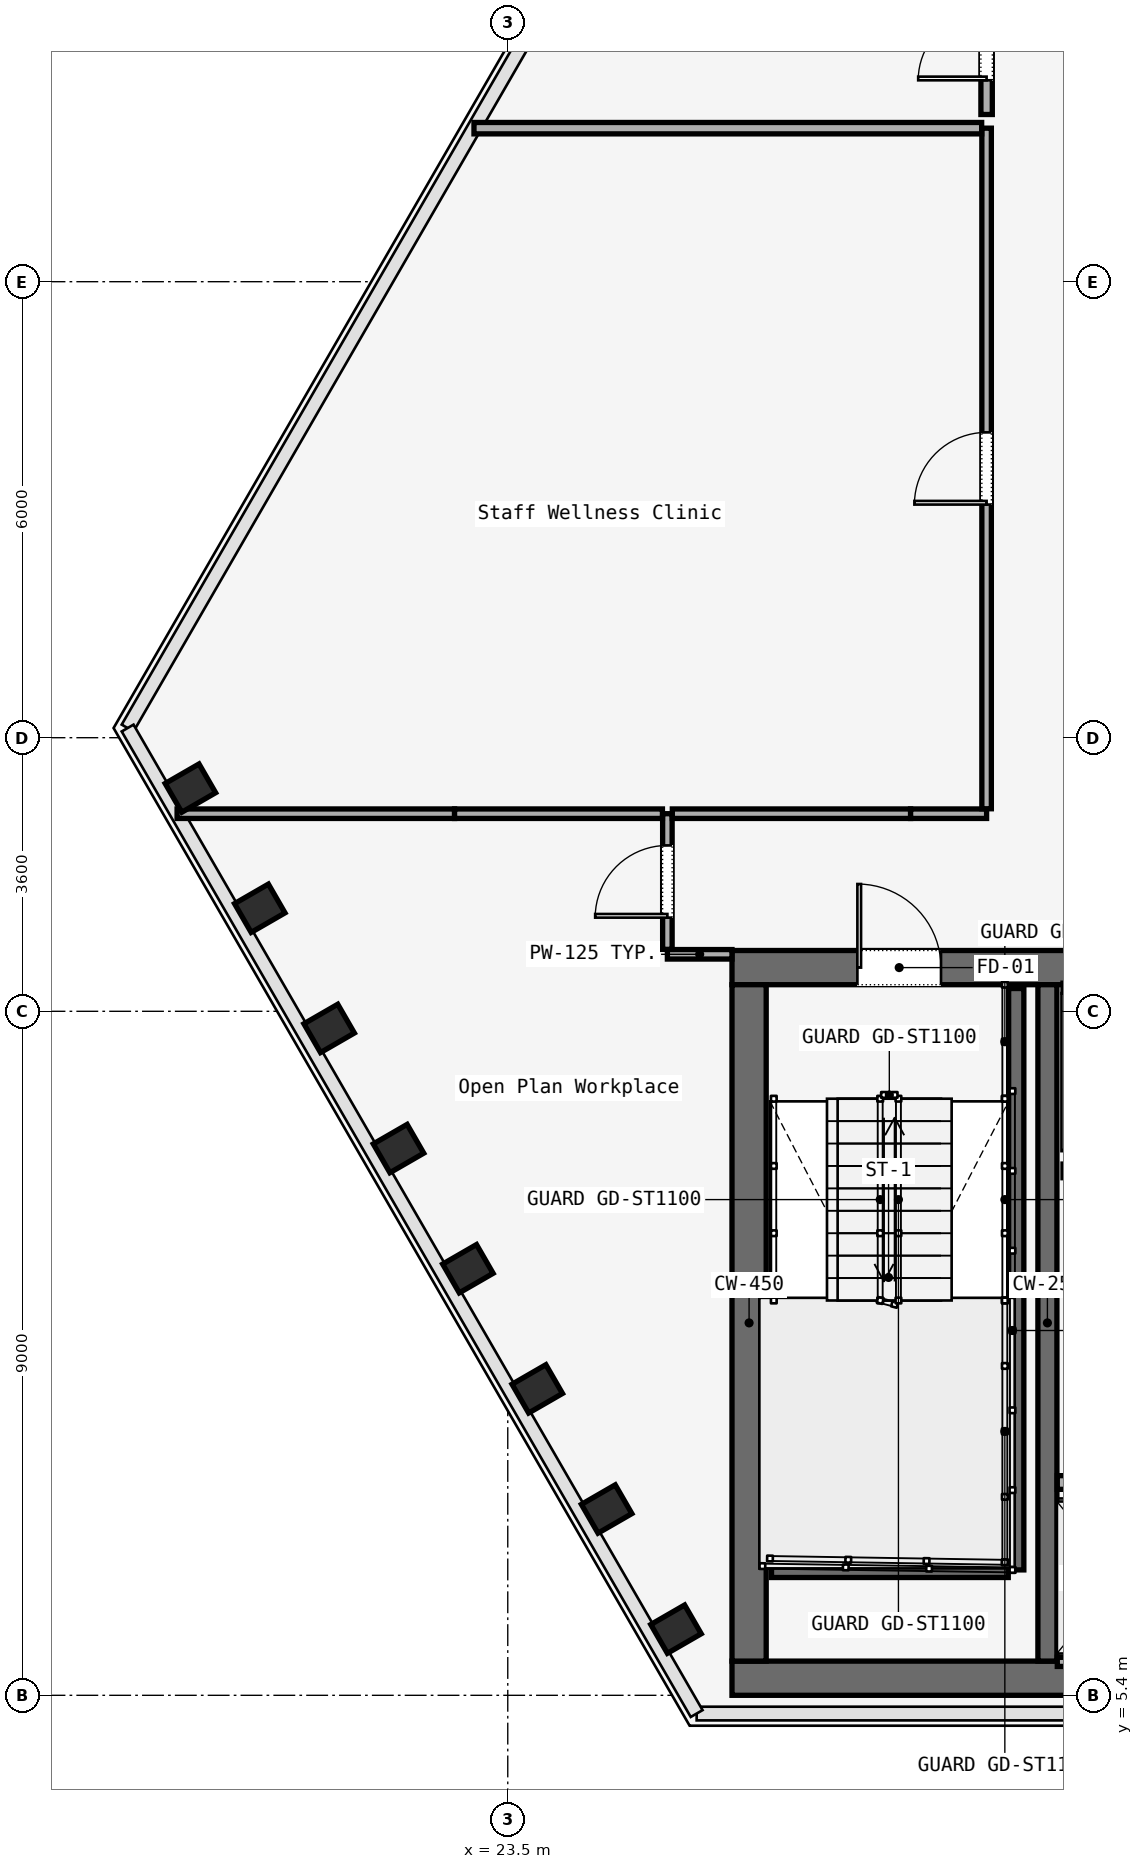
"""IFC4 building model, lengths in metres.
Left out: names, types, materials, properties, quantities, classifications, styles, units other than length and angle.
Written with IfcOpenShell. Run it as: python <this file> out.ifc"""

import sys

from ifc_helpers import new_model, si_unit, direction, frame, frame_2d, origin, origin_2d, place, context, subcontext, project, spatial, rectangle, i_section, extrude, element, fill, save


model = new_model("IFC4")
c1 = context("Model", 3, precision=1e-05, world=origin(), true_north=direction((0.0, 1.0)))
c2 = subcontext(c1, "Body", "Model", "MODEL_VIEW")
j1 = project(units=[si_unit("LENGTHUNIT", "METRE"), si_unit("PLANEANGLEUNIT", "RADIAN")], contexts=[c1])
p1 = place(None, origin())
s1 = spatial("IfcSite", under=j1, at=p1, CompositionType="ELEMENT")
p2 = place(p1, origin())
s2 = spatial("IfcBuilding", under=s1, at=p2, CompositionType="ELEMENT")
p3 = place(p2, frame((0.0, 0.0, 77.8)))
s3 = spatial("IfcBuildingStorey", under=s2, at=p3, CompositionType="ELEMENT", Elevation=77.8)
p4 = place(p3, frame((26.45, 14.975, 0.0), z_axis=(0.0, 0.0, 1.0), x_axis=(1.0, 0.0, 0.0)))
e1 = element("IfcWall", 1, at=p4, inside=s3, PredefinedType="SOLIDWALL", context=c2, shape_type="SweptSolid", body=[
    extrude(rectangle(XDim=31.1, YDim=0.45, at=frame_2d((15.55, 0.0))), origin(), (0.0, 0.0, 1.0), 3.58),
])
p5 = place(p4, frame((1.65, 0.0, 0.0)))
e2 = element("IfcOpeningElement", 2, at=p5, cuts=e1, PredefinedType="OPENING", context=c2, shape_type="SweptSolid", body=[
    extrude(rectangle(XDim=1.1, YDim=2.2, at=frame_2d((0.55, 1.1))), frame((0.0, 0.225, 0.0), z_axis=(0.0, -1.0, 0.0), x_axis=(1.0, 0.0, 0.0)), (0.0, 0.0, 1.0), 0.45),
])
p6 = place(p4, frame((13.65, 0.0, 0.0)))
e3 = element("IfcOpeningElement", 3, at=p6, cuts=e1, PredefinedType="OPENING", context=c2, shape_type="SweptSolid", body=[
    extrude(rectangle(XDim=1.1, YDim=2.2, at=frame_2d((0.55, 1.1))), frame((0.0, 0.225, 0.0), z_axis=(0.0, -1.0, 0.0), x_axis=(1.0, 0.0, 0.0)), (0.0, 0.0, 1.0), 0.45),
])
p7 = place(p4, frame((25.55, 0.0, 0.0)))
e4 = element("IfcOpeningElement", 4, at=p7, cuts=e1, PredefinedType="OPENING", context=c2, shape_type="SweptSolid", body=[
    extrude(rectangle(XDim=1.1, YDim=2.2, at=frame_2d((0.55, 1.1))), frame((0.0, 0.225, 0.0), z_axis=(0.0, -1.0, 0.0), x_axis=(1.0, 0.0, 0.0)), (0.0, 0.0, 1.0), 0.45),
])
p8 = place(p4, frame((10.7, 0.0, 0.0)))
e5 = element("IfcOpeningElement", 5, at=p8, cuts=e1, PredefinedType="OPENING", context=c2, shape_type="SweptSolid", body=[
    extrude(rectangle(XDim=1.4, YDim=2.2, at=frame_2d((0.7, 1.1))), frame((0.0, 0.225, 0.0), z_axis=(0.0, -1.0, 0.0), x_axis=(1.0, 0.0, 0.0)), (0.0, 0.0, 1.0), 0.45),
])
p9 = place(p4, frame((19.35, 0.0, 0.0)))
e6 = element("IfcOpeningElement", 6, at=p9, cuts=e1, PredefinedType="OPENING", context=c2, shape_type="SweptSolid", body=[
    extrude(rectangle(XDim=1.1, YDim=2.2, at=frame_2d((0.55, 1.1))), frame((0.0, 0.225, 0.0), z_axis=(0.0, -1.0, 0.0), x_axis=(1.0, 0.0, 0.0)), (0.0, 0.0, 1.0), 0.45),
])
p10 = place(p4, frame((21.4, 0.0, 0.0)))
e7 = element("IfcOpeningElement", 7, at=p10, cuts=e1, PredefinedType="OPENING", context=c2, shape_type="SweptSolid", body=[
    extrude(rectangle(XDim=0.9, YDim=2.1, at=frame_2d((0.45, 1.05))), frame((0.0, 0.225, 0.0), z_axis=(0.0, -1.0, 0.0), x_axis=(1.0, 0.0, 0.0)), (0.0, 0.0, 1.0), 0.45),
])
p11 = place(p4, frame((23.35, 0.0, 0.0)))
e8 = element("IfcOpeningElement", 8, at=p11, cuts=e1, PredefinedType="OPENING", context=c2, shape_type="SweptSolid", body=[
    extrude(rectangle(XDim=1.3, YDim=2.3, at=frame_2d((0.65, 1.15))), frame((0.0, 0.225, 0.0), z_axis=(0.0, -1.0, 0.0), x_axis=(1.0, 0.0, 0.0)), (0.0, 0.0, 1.0), 0.45),
])
p12 = place(p3, frame((26.45, 5.625, 0.0), z_axis=(0.0, 0.0, 1.0), x_axis=(1.0, 0.0, 0.0)))
e9 = element("IfcWall", 9, at=p12, inside=s3, PredefinedType="SOLIDWALL", context=c2, shape_type="SweptSolid", body=[
    extrude(rectangle(XDim=31.1, YDim=0.45, at=frame_2d((15.55, 0.0))), origin(), (0.0, 0.0, 1.0), 3.58),
])
p13 = place(p3, frame((26.675, 5.85, 0.0), z_axis=(0.0, 0.0, 1.0), x_axis=(0.0, 1.0, 0.0)))
e10 = element("IfcWall", 10, at=p13, inside=s3, PredefinedType="SOLIDWALL", context=c2, shape_type="SweptSolid", body=[
    extrude(rectangle(XDim=8.9, YDim=0.45, at=frame_2d((4.45, 0.0))), origin(), (0.0, 0.0, 1.0), 3.58),
])
p14 = place(p3, frame((30.6, 5.85, 0.0), z_axis=(0.0, 0.0, 1.0), x_axis=(0.0, 1.0, 0.0)))
e11 = element("IfcWall", 11, at=p14, inside=s3, PredefinedType="SOLIDWALL", context=c2, shape_type="SweptSolid", body=[
    extrude(rectangle(XDim=8.9, YDim=0.25, at=frame_2d((4.45, 0.0))), origin(), (0.0, 0.0, 1.0), 3.58),
])
p15 = place(p3, frame((19.324, 17.337, 0.0), z_axis=(-0.009608437026, -0.124503691039, 0.992172620493), x_axis=(-0.432402826745, 0.895171870126, 0.108143970513)))
e12 = element("IfcColumn", 12, at=p15, inside=s3, PredefinedType="COLUMN", context=c2, shape_type="SweptSolid", body=[
    extrude(i_section(OverallWidth=0.437, OverallDepth=0.514, WebThickness=0.061, FlangeThickness=0.077, FilletRadius=0.015, at=origin_2d()), origin(), (0.0, 0.0, 1.0), 3.608),
])
p16 = place(p3, frame((20.237, 15.756, 0.0), z_axis=(-0.019251328517, -0.108119256986, 0.993951514219), x_axis=(-0.341362230089, 0.935107767764, 0.095106732336)))
e13 = element("IfcColumn", 13, at=p16, inside=s3, PredefinedType="COLUMN", context=c2, shape_type="SweptSolid", body=[
    extrude(i_section(OverallWidth=0.437, OverallDepth=0.514, WebThickness=0.061, FlangeThickness=0.077, FilletRadius=0.015, at=origin_2d()), origin(), (0.0, 0.0, 1.0), 3.602),
])
p17 = place(p3, frame((21.15, 14.175, 0.0), z_axis=(-0.02891844144, -0.09157506456, 0.995378185061), x_axis=(-0.217209229225, 0.972575677884, 0.083166709256)))
e14 = element("IfcColumn", 14, at=p17, inside=s3, PredefinedType="COLUMN", context=c2, shape_type="SweptSolid", body=[
    extrude(i_section(OverallWidth=0.437, OverallDepth=0.514, WebThickness=0.061, FlangeThickness=0.077, FilletRadius=0.015, at=origin_2d()), origin(), (0.0, 0.0, 1.0), 3.596),
])
p18 = place(p3, frame((22.062, 12.594, 0.0), z_axis=(-0.038463129427, -0.075023489201, 0.996439693982), x_axis=(-0.051243793832, 0.996013615068, 0.07301336996)))
e15 = element("IfcColumn", 15, at=p18, inside=s3, PredefinedType="COLUMN", context=c2, shape_type="SweptSolid", body=[
    extrude(i_section(OverallWidth=0.437, OverallDepth=0.514, WebThickness=0.061, FlangeThickness=0.077, FilletRadius=0.015, at=origin_2d()), origin(), (0.0, 0.0, 1.0), 3.593),
])
p19 = place(p3, frame((22.975, 11.013, 0.0), z_axis=(-0.048214100692, -0.058414545126, 0.99712744492), x_axis=(0.164075575958, 0.984264477381, 0.065594542005)))
e16 = element("IfcColumn", 16, at=p19, inside=s3, PredefinedType="COLUMN", context=c2, shape_type="SweptSolid", body=[
    extrude(i_section(OverallWidth=0.437, OverallDepth=0.514, WebThickness=0.061, FlangeThickness=0.077, FilletRadius=0.015, at=origin_2d()), origin(), (0.0, 0.0, 1.0), 3.59),
])
p20 = place(p3, frame((23.888, 9.432, 0.0), z_axis=(-0.057889342979, -0.041699373967, 0.997451746292), x_axis=(0.40866877957, 0.910588995233, 0.061786004603)))
e17 = element("IfcColumn", 17, at=p20, inside=s3, PredefinedType="COLUMN", context=c2, shape_type="SweptSolid", body=[
    extrude(i_section(OverallWidth=0.437, OverallDepth=0.514, WebThickness=0.061, FlangeThickness=0.077, FilletRadius=0.015, at=origin_2d()), origin(), (0.0, 0.0, 1.0), 3.589),
])
p21 = place(p3, frame((24.801, 7.851, 0.0), z_axis=(-0.067477832085, -0.025032098999, 0.99740670551), x_axis=(0.635947109951, 0.769211528445, 0.062328948751)))
e18 = element("IfcColumn", 18, at=p21, inside=s3, PredefinedType="COLUMN", context=c2, shape_type="SweptSolid", body=[
    extrude(i_section(OverallWidth=0.437, OverallDepth=0.514, WebThickness=0.061, FlangeThickness=0.077, FilletRadius=0.015, at=origin_2d()), origin(), (0.0, 0.0, 1.0), 3.589),
])
p22 = place(p3, frame((25.713, 6.271, 0.0), z_axis=(-0.077036980807, -0.008363237987, 0.996993159374), x_axis=(0.804414378603, 0.590266064903, 0.067107973603)))
e19 = element("IfcColumn", 19, at=p22, inside=s3, PredefinedType="COLUMN", context=c2, shape_type="SweptSolid", body=[
    extrude(i_section(OverallWidth=0.437, OverallDepth=0.514, WebThickness=0.061, FlangeThickness=0.077, FilletRadius=0.015, at=origin_2d()), origin(), (0.0, 0.0, 1.0), 3.591),
])
p23 = place(p3, frame((30.19, 14.7, 0.0), z_axis=(0.0, 0.0, 1.0), x_axis=(0.0, -1.0, 0.0)))
e20 = element("IfcWall", 20, at=p23, inside=s3, PredefinedType="SOLIDWALL", context=c2, shape_type="SweptSolid", body=[
    extrude(rectangle(XDim=7.65, YDim=0.2, at=frame_2d((3.825, 0.0))), origin(), (0.0, 0.0, 1.0), 3.8),
])
p24 = place(p3, frame((26.97, 7.05, 0.0), z_axis=(0.0, 0.0, 1.0), x_axis=(1.0, 0.0, 0.0)))
e21 = element("IfcWall", 21, at=p24, inside=s3, PredefinedType="SOLIDWALL", context=c2, shape_type="SweptSolid", body=[
    extrude(rectangle(XDim=3.115, YDim=0.2, at=frame_2d((1.558, 0.0))), origin(), (0.0, 0.0, 1.0), 3.8),
])
p25 = place(p3, frame((30.73, 8.2, 0.0), z_axis=(0.0, 0.0, 1.0), x_axis=(1.0, 0.0, 0.0)))
e22 = element("IfcWall", 22, at=p25, inside=s3, PredefinedType="SOLIDWALL", context=c2, shape_type="SweptSolid", body=[
    extrude(rectangle(XDim=1.665, YDim=0.18, at=frame_2d((0.833, 0.0))), origin(), (0.0, 0.0, 1.0), 2.95),
])
p26 = place(p25, frame((0.282, 0.0, 0.0)))
e23 = element("IfcOpeningElement", 23, at=p26, cuts=e22, PredefinedType="OPENING", context=c2, shape_type="SweptSolid", body=[
    extrude(rectangle(XDim=1.1, YDim=2.2, at=frame_2d((0.55, 1.1))), frame((0.0, 0.09, 0.0), z_axis=(0.0, -1.0, 0.0), x_axis=(1.0, 0.0, 0.0)), (0.0, 0.0, 1.0), 0.18),
])
p27 = place(p3, frame((30.73, 5.84, 0.0), z_axis=(0.0, 0.0, 1.0), x_axis=(1.0, 0.0, 0.0)))
e24 = element("IfcWall", 24, at=p27, inside=s3, PredefinedType="SOLIDWALL", context=c2, shape_type="SweptSolid", body=[
    extrude(rectangle(XDim=1.665, YDim=0.12, at=frame_2d((0.833, 0.0))), origin(), (0.0, 0.0, 1.0), 2.95),
])
p28 = place(p3, frame((26.45, 15.15, 0.0), z_axis=(0.0, 0.0, 1.0), x_axis=(-1.0, 0.0, 0.0)))
e25 = element("IfcWall", 25, at=p28, inside=s3, PredefinedType="PARTITIONING", context=c2, shape_type="SweptSolid", body=[
    extrude(rectangle(XDim=0.85, YDim=0.125, at=frame_2d((0.425, 0.0))), origin(), (0.0, 0.0, 1.0), 2.95),
])
p29 = place(p3, frame((25.6, 15.215, 0.0), z_axis=(0.0, 0.0, 1.0), x_axis=(0.0, 1.0, 0.0)))
e26 = element("IfcWall", 26, at=p29, inside=s3, PredefinedType="PARTITIONING", context=c2, shape_type="SweptSolid", body=[
    extrude(rectangle(XDim=1.785, YDim=0.125, at=frame_2d((0.893, 0.0))), origin(), (0.0, 0.0, 1.0), 2.95),
])
p30 = place(p29, frame((0.417, 0.0, 0.0)))
e27 = element("IfcOpeningElement", 27, at=p30, cuts=e26, PredefinedType="OPENING", context=c2, shape_type="SweptSolid", body=[
    extrude(rectangle(XDim=0.95, YDim=2.2, at=frame_2d((0.475, 1.1))), frame((0.0, 0.062, 0.0), z_axis=(0.0, -1.0, 0.0), x_axis=(1.0, 0.0, 0.0)), (0.0, 0.0, 1.0), 0.125),
])
p31 = place(p3, frame((25.665, 17.0, 0.0), z_axis=(0.0, 0.0, 1.0), x_axis=(1.0, 0.0, 0.0)))
e28 = element("IfcWall", 28, at=p31, inside=s3, PredefinedType="PARTITIONING", context=c2, shape_type="SweptSolid", body=[
    extrude(rectangle(XDim=3.135, YDim=0.125, at=frame_2d((1.567, 0.0))), origin(), (0.0, 0.0, 1.0), 2.95),
])
p32 = place(p3, frame((28.8, 17.0, 0.0), z_axis=(0.0, 0.0, 1.0), x_axis=(1.0, 0.0, 0.0)))
e29 = element("IfcWall", 29, at=p32, inside=s3, PredefinedType="PARTITIONING", context=c2, shape_type="SweptSolid", body=[
    extrude(rectangle(XDim=1.0, YDim=0.125, at=frame_2d((0.5, 0.0))), origin(), (0.0, 0.0, 1.0), 2.95),
])
p33 = place(p3, frame((29.8, 17.065, 0.0), z_axis=(0.0, 0.0, 1.0), x_axis=(0.0, 1.0, 0.0)))
e30 = element("IfcWall", 30, at=p33, inside=s3, PredefinedType="PARTITIONING", context=c2, shape_type="SweptSolid", body=[
    extrude(rectangle(XDim=8.955, YDim=0.125, at=frame_2d((4.478, 0.0))), origin(), (0.0, 0.0, 1.0), 2.95),
])
p34 = place(p33, frame((4.002, 0.0, 0.0)))
e31 = element("IfcOpeningElement", 31, at=p34, cuts=e30, PredefinedType="OPENING", context=c2, shape_type="SweptSolid", body=[
    extrude(rectangle(XDim=0.95, YDim=2.2, at=frame_2d((0.475, 1.1))), frame((0.0, 0.062, 0.0), z_axis=(0.0, -1.0, 0.0), x_axis=(1.0, 0.0, 0.0)), (0.0, 0.0, 1.0), 0.125),
])
p35 = place(p3, frame((29.8, 26.2, 0.0), z_axis=(0.0, 0.0, 1.0), x_axis=(0.0, 1.0, 0.0)))
e32 = element("IfcWall", 32, at=p35, inside=s3, PredefinedType="PARTITIONING", context=c2, shape_type="SweptSolid", body=[
    extrude(rectangle(XDim=1.8, YDim=0.15, at=frame_2d((0.9, 0.0))), origin(), (0.0, 0.0, 1.0), 2.95),
])
p36 = place(p35, frame((0.45, 0.0, 0.0)))
e33 = element("IfcOpeningElement", 33, at=p36, cuts=e32, PredefinedType="OPENING", context=c2, shape_type="SweptSolid", body=[
    extrude(rectangle(XDim=0.9, YDim=2.15, at=frame_2d((0.45, 1.075))), frame((0.0, 0.075, 0.0), z_axis=(0.0, -1.0, 0.0), x_axis=(1.0, 0.0, 0.0)), (0.0, 0.0, 1.0), 0.15),
])
p37 = place(p3, frame((19.149, 17.0, 0.0), z_axis=(0.0, 0.0, 1.0), x_axis=(1.0, 0.0, 0.0)))
e34 = element("IfcWall", 34, at=p37, inside=s3, PredefinedType="PARTITIONING", context=c2, shape_type="SweptSolid", body=[
    extrude(rectangle(XDim=3.651, YDim=0.125, at=frame_2d((1.825, 0.0))), origin(), (0.0, 0.0, 1.0), 2.95),
])
p38 = place(p3, frame((22.8, 17.0, 0.0), z_axis=(0.0, 0.0, 1.0), x_axis=(1.0, 0.0, 0.0)))
e35 = element("IfcWall", 35, at=p38, inside=s3, PredefinedType="PARTITIONING", context=c2, shape_type="SweptSolid", body=[
    extrude(rectangle(XDim=2.735, YDim=0.125, at=frame_2d((1.367, 0.0))), origin(), (0.0, 0.0, 1.0), 2.95),
])
p39 = place(p3, frame((23.055, 26.02, 0.0), z_axis=(0.0, 0.0, 1.0), x_axis=(1.0, 0.0, 0.0)))
e36 = element("IfcWall", 36, at=p39, inside=s3, PredefinedType="PARTITIONING", context=c2, shape_type="SweptSolid", body=[
    extrude(rectangle(XDim=6.68, YDim=0.15, at=frame_2d((3.34, 0.0))), origin(), (0.0, 0.0, 1.0), 2.95),
])
p40 = place(p5, origin())
e37 = element("IfcDoor", 37, at=p40, inside=s3, OperationType="SINGLE_SWING_RIGHT", PredefinedType="DOOR", context=c2, shape_type="SweptSolid", body=[
    extrude(rectangle(XDim=1.1, YDim=2.2, at=frame_2d((0.55, 1.1))), frame((0.0, 0.025, 0.0), z_axis=(0.0, -1.0, 0.0), x_axis=(1.0, 0.0, 0.0)), (0.0, 0.0, 1.0), 0.05),
])
fill(e2, e37)
p41 = place(p30, origin())
e38 = element("IfcDoor", 38, at=p41, inside=s3, OperationType="SINGLE_SWING_RIGHT", PredefinedType="DOOR", context=c2, shape_type="SweptSolid", body=[
    extrude(rectangle(XDim=0.95, YDim=2.2, at=frame_2d((0.475, 1.1))), frame((0.0, 0.025, 0.0), z_axis=(0.0, -1.0, 0.0), x_axis=(1.0, 0.0, 0.0)), (0.0, 0.0, 1.0), 0.05),
])
fill(e27, e38)
p42 = place(p34, origin())
e39 = element("IfcDoor", 39, at=p42, inside=s3, OperationType="SINGLE_SWING_RIGHT", PredefinedType="DOOR", context=c2, shape_type="SweptSolid", body=[
    extrude(rectangle(XDim=0.95, YDim=2.2, at=frame_2d((0.475, 1.1))), frame((0.0, 0.025, 0.0), z_axis=(0.0, -1.0, 0.0), x_axis=(1.0, 0.0, 0.0)), (0.0, 0.0, 1.0), 0.05),
])
fill(e31, e39)
p43 = place(p36, origin())
e40 = element("IfcDoor", 40, at=p43, inside=s3, OperationType="SINGLE_SWING_LEFT", PredefinedType="DOOR", context=c2, shape_type="SweptSolid", body=[
    extrude(rectangle(XDim=0.9, YDim=2.15, at=frame_2d((0.45, 1.075))), frame((0.0, 0.025, 0.0), z_axis=(0.0, -1.0, 0.0), x_axis=(1.0, 0.0, 0.0)), (0.0, 0.0, 1.0), 0.05),
])
fill(e33, e40)
save(model, sys.argv[1])
